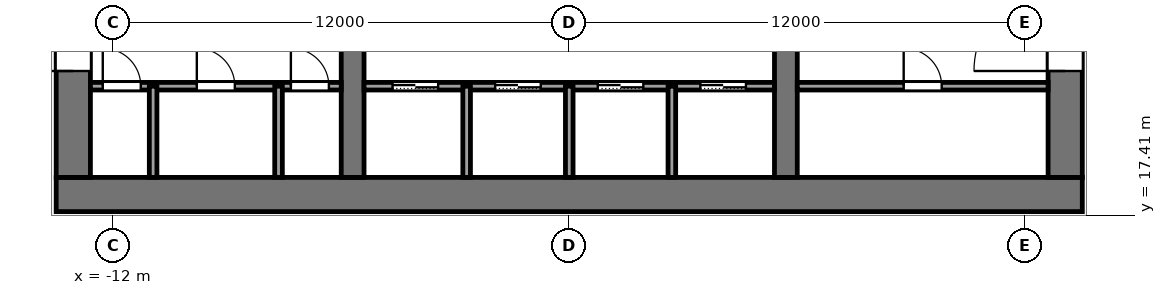
"""IFC4 building model, lengths in metres.
Left out: names, types, materials, properties, quantities, classifications, styles, units other than length and angle.
Written with IfcOpenShell. Run it as: python <this file> out.ifc"""

import sys

from ifc_helpers import new_model, si_unit, direction, frame, frame_2d, origin, place, context, subcontext, project, spatial, rectangle, extrude, element, fill, save


model = new_model("IFC4")
c1 = context("Model", 3, precision=1e-05, world=origin(), true_north=direction((0.0, 1.0)))
c2 = subcontext(c1, "Body", "Model", "MODEL_VIEW")
j1 = project(units=[si_unit("LENGTHUNIT", "METRE"), si_unit("PLANEANGLEUNIT", "RADIAN")], contexts=[c1])
p1 = place(None, origin())
s1 = spatial("IfcSite", under=j1, at=p1, CompositionType="ELEMENT")
p2 = place(p1, origin())
s2 = spatial("IfcBuilding", under=s1, at=p2, CompositionType="ELEMENT")
p3 = place(p2, frame((0.0, 0.0, 202.0)))
s3 = spatial("IfcBuildingStorey", under=s2, at=p3, CompositionType="ELEMENT", Elevation=202.0)
p4 = place(p3, frame((-13.5, 17.95, -0.13), z_axis=(0.0, 0.0, 1.0), x_axis=(1.0, 0.0, 0.0)))
e1 = element("IfcWall", 1, at=p4, inside=s3, PredefinedType="SHEAR", context=c2, shape_type="SweptSolid", body=[
    extrude(rectangle(XDim=27.0, YDim=0.9, at=frame_2d((13.5, 0.0))), origin(), (0.0, 0.0, 1.0), 4.0),
])
p5 = place(p3, frame((-13.05, 18.4, -0.13), z_axis=(0.0, 0.0, 1.0), x_axis=(0.0, 1.0, 0.0)))
e2 = element("IfcWall", 2, at=p5, inside=s3, PredefinedType="SHEAR", context=c2, shape_type="SweptSolid", body=[
    extrude(rectangle(XDim=19.2, YDim=0.9, at=frame_2d((9.6, 0.0))), origin(), (0.0, 0.0, 1.0), 4.0),
])
p6 = place(p5, frame((2.8, 0.0, 0.13)))
e3 = element("IfcOpeningElement", 3, at=p6, cuts=e2, PredefinedType="OPENING", context=c2, shape_type="SweptSolid", body=[
    extrude(rectangle(XDim=2.4, YDim=2.4, at=frame_2d((1.2, 1.2))), frame((0.0, 0.46, 0.0), z_axis=(0.0, -1.0, 0.0), x_axis=(1.0, 0.0, 0.0)), (0.0, 0.0, 1.0), 0.92),
])
p7 = place(p5, frame((13.4, 0.0, 0.13)))
e4 = element("IfcOpeningElement", 4, at=p7, cuts=e2, PredefinedType="OPENING", context=c2, shape_type="SweptSolid", body=[
    extrude(rectangle(XDim=1.4, YDim=2.2, at=frame_2d((0.7, 1.1))), frame((0.0, 0.46, 0.0), z_axis=(0.0, -1.0, 0.0), x_axis=(1.0, 0.0, 0.0)), (0.0, 0.0, 1.0), 0.92),
])
p8 = place(p3, frame((13.05, 18.4, -0.13), z_axis=(0.0, 0.0, 1.0), x_axis=(0.0, 1.0, 0.0)))
e5 = element("IfcWall", 5, at=p8, inside=s3, PredefinedType="SHEAR", context=c2, shape_type="SweptSolid", body=[
    extrude(rectangle(XDim=19.2, YDim=0.9, at=frame_2d((9.6, 0.0))), origin(), (0.0, 0.0, 1.0), 4.0),
])
p9 = place(p8, frame((2.8, 0.0, 0.13)))
e6 = element("IfcOpeningElement", 6, at=p9, cuts=e5, PredefinedType="OPENING", context=c2, shape_type="SweptSolid", body=[
    extrude(rectangle(XDim=2.4, YDim=2.4, at=frame_2d((1.2, 1.2))), frame((0.0, 0.46, 0.0), z_axis=(0.0, -1.0, 0.0), x_axis=(1.0, 0.0, 0.0)), (0.0, 0.0, 1.0), 0.92),
])
p10 = place(p8, frame((13.3, 0.0, 0.13)))
e7 = element("IfcOpeningElement", 7, at=p10, cuts=e5, PredefinedType="OPENING", context=c2, shape_type="SweptSolid", body=[
    extrude(rectangle(XDim=2.4, YDim=2.4, at=frame_2d((1.2, 1.2))), frame((0.0, 0.46, 0.0), z_axis=(0.0, -1.0, 0.0), x_axis=(1.0, 0.0, 0.0)), (0.0, 0.0, 1.0), 0.92),
])
p11 = place(p3, frame((-5.7, 18.4, -0.13), z_axis=(0.0, 0.0, 1.0), x_axis=(0.0, 1.0, 0.0)))
e8 = element("IfcWall", 8, at=p11, inside=s3, PredefinedType="SHEAR", context=c2, shape_type="SweptSolid", body=[
    extrude(rectangle(XDim=19.2, YDim=0.6, at=frame_2d((9.6, 0.0))), origin(), (0.0, 0.0, 1.0), 4.0),
])
p12 = place(p11, frame((8.35, 0.0, 0.13)))
e9 = element("IfcOpeningElement", 9, at=p12, cuts=e8, PredefinedType="OPENING", context=c2, shape_type="SweptSolid", body=[
    extrude(rectangle(XDim=0.9, YDim=2.1, at=frame_2d((0.45, 1.05))), frame((0.0, 0.31, 0.0), z_axis=(0.0, -1.0, 0.0), x_axis=(1.0, 0.0, 0.0)), (0.0, 0.0, 1.0), 0.62),
])
p13 = place(p3, frame((5.7, 18.4, -0.13), z_axis=(0.0, 0.0, 1.0), x_axis=(0.0, 1.0, 0.0)))
e10 = element("IfcWall", 10, at=p13, inside=s3, PredefinedType="SHEAR", context=c2, shape_type="SweptSolid", body=[
    extrude(rectangle(XDim=19.2, YDim=0.6, at=frame_2d((9.6, 0.0))), origin(), (0.0, 0.0, 1.0), 4.0),
])
p14 = place(p13, frame((8.35, 0.0, 0.13)))
e11 = element("IfcOpeningElement", 11, at=p14, cuts=e10, PredefinedType="OPENING", context=c2, shape_type="SweptSolid", body=[
    extrude(rectangle(XDim=0.9, YDim=2.1, at=frame_2d((0.45, 1.05))), frame((0.0, 0.31, 0.0), z_axis=(0.0, -1.0, 0.0), x_axis=(1.0, 0.0, 0.0)), (0.0, 0.0, 1.0), 0.62),
])
p15 = place(p13, frame((13.3, 0.0, 0.13)))
e12 = element("IfcOpeningElement", 12, at=p15, cuts=e10, PredefinedType="OPENING", context=c2, shape_type="SweptSolid", body=[
    extrude(rectangle(XDim=2.4, YDim=2.4, at=frame_2d((1.2, 1.2))), frame((0.0, 0.31, 0.0), z_axis=(0.0, -1.0, 0.0), x_axis=(1.0, 0.0, 0.0)), (0.0, 0.0, 1.0), 0.62),
])
p16 = place(p3, frame((-12.6, 20.8, 0.0), z_axis=(0.0, 0.0, 1.0), x_axis=(1.0, 0.0, 0.0)))
e13 = element("IfcWall", 13, at=p16, inside=s3, PredefinedType="PARTITIONING", context=c2, shape_type="SweptSolid", body=[
    extrude(rectangle(XDim=6.6, YDim=0.2, at=frame_2d((3.3, 0.0))), origin(), (0.0, 0.0, 1.0), 3.87),
])
p17 = place(p16, frame((0.325, 0.0, 0.0)))
e14 = element("IfcOpeningElement", 14, at=p17, cuts=e13, PredefinedType="OPENING", context=c2, shape_type="SweptSolid", body=[
    extrude(rectangle(XDim=1.0, YDim=2.1, at=frame_2d((0.5, 1.05))), frame((0.0, 0.11, 0.0), z_axis=(0.0, -1.0, 0.0), x_axis=(1.0, 0.0, 0.0)), (0.0, 0.0, 1.0), 0.22),
])
p18 = place(p16, frame((2.8, 0.0, 0.0)))
e15 = element("IfcOpeningElement", 15, at=p18, cuts=e13, PredefinedType="OPENING", context=c2, shape_type="SweptSolid", body=[
    extrude(rectangle(XDim=1.0, YDim=2.1, at=frame_2d((0.5, 1.05))), frame((0.0, 0.11, 0.0), z_axis=(0.0, -1.0, 0.0), x_axis=(1.0, 0.0, 0.0)), (0.0, 0.0, 1.0), 0.22),
])
p19 = place(p16, frame((5.275, 0.0, 0.0)))
e16 = element("IfcOpeningElement", 16, at=p19, cuts=e13, PredefinedType="OPENING", context=c2, shape_type="SweptSolid", body=[
    extrude(rectangle(XDim=1.0, YDim=2.1, at=frame_2d((0.5, 1.05))), frame((0.0, 0.11, 0.0), z_axis=(0.0, -1.0, 0.0), x_axis=(1.0, 0.0, 0.0)), (0.0, 0.0, 1.0), 0.22),
])
p20 = place(p3, frame((-5.4, 20.8, 0.0), z_axis=(0.0, 0.0, 1.0), x_axis=(1.0, 0.0, 0.0)))
e17 = element("IfcWall", 17, at=p20, inside=s3, PredefinedType="PARTITIONING", context=c2, shape_type="SweptSolid", body=[
    extrude(rectangle(XDim=10.8, YDim=0.2, at=frame_2d((5.4, 0.0))), origin(), (0.0, 0.0, 1.0), 3.87),
])
p21 = place(p20, frame((0.75, 0.0, 0.0)))
e18 = element("IfcOpeningElement", 18, at=p21, cuts=e17, PredefinedType="OPENING", context=c2, shape_type="SweptSolid", body=[
    extrude(rectangle(XDim=1.2, YDim=2.2, at=frame_2d((0.6, 1.1))), frame((0.0, 0.11, 0.0), z_axis=(0.0, -1.0, 0.0), x_axis=(1.0, 0.0, 0.0)), (0.0, 0.0, 1.0), 0.22),
])
p22 = place(p20, frame((3.45, 0.0, 0.0)))
e19 = element("IfcOpeningElement", 19, at=p22, cuts=e17, PredefinedType="OPENING", context=c2, shape_type="SweptSolid", body=[
    extrude(rectangle(XDim=1.2, YDim=2.2, at=frame_2d((0.6, 1.1))), frame((0.0, 0.11, 0.0), z_axis=(0.0, -1.0, 0.0), x_axis=(1.0, 0.0, 0.0)), (0.0, 0.0, 1.0), 0.22),
])
p23 = place(p20, frame((6.15, 0.0, 0.0)))
e20 = element("IfcOpeningElement", 20, at=p23, cuts=e17, PredefinedType="OPENING", context=c2, shape_type="SweptSolid", body=[
    extrude(rectangle(XDim=1.2, YDim=2.2, at=frame_2d((0.6, 1.1))), frame((0.0, 0.11, 0.0), z_axis=(0.0, -1.0, 0.0), x_axis=(1.0, 0.0, 0.0)), (0.0, 0.0, 1.0), 0.22),
])
p24 = place(p20, frame((8.85, 0.0, 0.0)))
e21 = element("IfcOpeningElement", 21, at=p24, cuts=e17, PredefinedType="OPENING", context=c2, shape_type="SweptSolid", body=[
    extrude(rectangle(XDim=1.2, YDim=2.2, at=frame_2d((0.6, 1.1))), frame((0.0, 0.11, 0.0), z_axis=(0.0, -1.0, 0.0), x_axis=(1.0, 0.0, 0.0)), (0.0, 0.0, 1.0), 0.22),
])
p25 = place(p3, frame((6.0, 20.8, 0.0), z_axis=(0.0, 0.0, 1.0), x_axis=(1.0, 0.0, 0.0)))
e22 = element("IfcWall", 22, at=p25, inside=s3, PredefinedType="PARTITIONING", context=c2, shape_type="SweptSolid", body=[
    extrude(rectangle(XDim=6.6, YDim=0.2, at=frame_2d((3.3, 0.0))), origin(), (0.0, 0.0, 1.0), 3.87),
])
p26 = place(p25, frame((2.8, 0.0, 0.0)))
e23 = element("IfcOpeningElement", 23, at=p26, cuts=e22, PredefinedType="OPENING", context=c2, shape_type="SweptSolid", body=[
    extrude(rectangle(XDim=1.0, YDim=2.1, at=frame_2d((0.5, 1.05))), frame((0.0, 0.11, 0.0), z_axis=(0.0, -1.0, 0.0), x_axis=(1.0, 0.0, 0.0)), (0.0, 0.0, 1.0), 0.22),
])
for number, where, z_axis, x_axis in (
    (24, (-10.95, 18.4, 0.0), (0.0, 0.0, 1.0), (0.0, 1.0, 0.0)),
    (25, (-7.65, 18.4, 0.0), (0.0, 0.0, 1.0), (0.0, 1.0, 0.0)),
    (26, (-2.7, 18.4, 0.0), (0.0, 0.0, 1.0), (0.0, 1.0, 0.0)),
    (27, (0.0, 18.4, 0.0), (0.0, 0.0, 1.0), (0.0, 1.0, 0.0)),
    (28, (2.7, 18.4, 0.0), (0.0, 0.0, 1.0), (0.0, 1.0, 0.0)),
):
    element("IfcWall", number, at=place(p3, frame(where, z_axis=z_axis, x_axis=x_axis)), inside=s3, PredefinedType="PARTITIONING", context=c2, shape_type="SweptSolid", body=[
        extrude(rectangle(XDim=2.4, YDim=0.2, at=frame_2d((1.2, 0.0))), origin(), (0.0, 0.0, 1.0), 3.87),
    ])
p27 = place(p21, origin())
e29 = element("IfcDoor", 29, at=p27, inside=s3, OperationType="SLIDING_TO_LEFT", PredefinedType="DOOR", context=c2, shape_type="SweptSolid", body=[
    extrude(rectangle(XDim=1.2, YDim=2.2, at=frame_2d((0.6, 1.1))), frame((0.0, 0.025, 0.0), z_axis=(0.0, -1.0, 0.0), x_axis=(1.0, 0.0, 0.0)), (0.0, 0.0, 1.0), 0.05),
])
fill(e18, e29)
p28 = place(p22, origin())
e30 = element("IfcDoor", 30, at=p28, inside=s3, OperationType="SLIDING_TO_LEFT", PredefinedType="DOOR", context=c2, shape_type="SweptSolid", body=[
    extrude(rectangle(XDim=1.2, YDim=2.2, at=frame_2d((0.6, 1.1))), frame((0.0, 0.025, 0.0), z_axis=(0.0, -1.0, 0.0), x_axis=(1.0, 0.0, 0.0)), (0.0, 0.0, 1.0), 0.05),
])
fill(e19, e30)
p29 = place(p23, origin())
e31 = element("IfcDoor", 31, at=p29, inside=s3, OperationType="SLIDING_TO_LEFT", PredefinedType="DOOR", context=c2, shape_type="SweptSolid", body=[
    extrude(rectangle(XDim=1.2, YDim=2.2, at=frame_2d((0.6, 1.1))), frame((0.0, 0.025, 0.0), z_axis=(0.0, -1.0, 0.0), x_axis=(1.0, 0.0, 0.0)), (0.0, 0.0, 1.0), 0.05),
])
fill(e20, e31)
p30 = place(p24, origin())
e32 = element("IfcDoor", 32, at=p30, inside=s3, OperationType="SLIDING_TO_LEFT", PredefinedType="DOOR", context=c2, shape_type="SweptSolid", body=[
    extrude(rectangle(XDim=1.2, YDim=2.2, at=frame_2d((0.6, 1.1))), frame((0.0, 0.025, 0.0), z_axis=(0.0, -1.0, 0.0), x_axis=(1.0, 0.0, 0.0)), (0.0, 0.0, 1.0), 0.05),
])
fill(e21, e32)
p31 = place(p17, origin())
e33 = element("IfcDoor", 33, at=p31, inside=s3, OperationType="SINGLE_SWING_RIGHT", PredefinedType="DOOR", context=c2, shape_type="SweptSolid", body=[
    extrude(rectangle(XDim=1.0, YDim=2.1, at=frame_2d((0.5, 1.05))), frame((0.0, 0.025, 0.0), z_axis=(0.0, -1.0, 0.0), x_axis=(1.0, 0.0, 0.0)), (0.0, 0.0, 1.0), 0.05),
])
fill(e14, e33)
p32 = place(p18, origin())
e34 = element("IfcDoor", 34, at=p32, inside=s3, OperationType="SINGLE_SWING_RIGHT", PredefinedType="DOOR", context=c2, shape_type="SweptSolid", body=[
    extrude(rectangle(XDim=1.0, YDim=2.1, at=frame_2d((0.5, 1.05))), frame((0.0, 0.025, 0.0), z_axis=(0.0, -1.0, 0.0), x_axis=(1.0, 0.0, 0.0)), (0.0, 0.0, 1.0), 0.05),
])
fill(e15, e34)
p33 = place(p19, origin())
e35 = element("IfcDoor", 35, at=p33, inside=s3, OperationType="SINGLE_SWING_RIGHT", PredefinedType="DOOR", context=c2, shape_type="SweptSolid", body=[
    extrude(rectangle(XDim=1.0, YDim=2.1, at=frame_2d((0.5, 1.05))), frame((0.0, 0.025, 0.0), z_axis=(0.0, -1.0, 0.0), x_axis=(1.0, 0.0, 0.0)), (0.0, 0.0, 1.0), 0.05),
])
fill(e16, e35)
p34 = place(p26, origin())
e36 = element("IfcDoor", 36, at=p34, inside=s3, OperationType="SINGLE_SWING_RIGHT", PredefinedType="DOOR", context=c2, shape_type="SweptSolid", body=[
    extrude(rectangle(XDim=1.0, YDim=2.1, at=frame_2d((0.5, 1.05))), frame((0.0, 0.025, 0.0), z_axis=(0.0, -1.0, 0.0), x_axis=(1.0, 0.0, 0.0)), (0.0, 0.0, 1.0), 0.05),
])
fill(e23, e36)
p35 = place(p6, origin())
e37 = element("IfcDoor", 37, at=p35, inside=s3, OperationType="DOUBLE_DOOR_SINGLE_SWING", PredefinedType="DOOR", context=c2, shape_type="SweptSolid", body=[
    extrude(rectangle(XDim=2.4, YDim=2.4, at=frame_2d((1.2, 1.2))), frame((0.0, 0.025, 0.0), z_axis=(0.0, -1.0, 0.0), x_axis=(1.0, 0.0, 0.0)), (0.0, 0.0, 1.0), 0.05),
])
fill(e3, e37)
p36 = place(p9, origin())
e38 = element("IfcDoor", 38, at=p36, inside=s3, OperationType="DOUBLE_DOOR_SINGLE_SWING", PredefinedType="DOOR", context=c2, shape_type="SweptSolid", body=[
    extrude(rectangle(XDim=2.4, YDim=2.4, at=frame_2d((1.2, 1.2))), frame((0.0, 0.025, 0.0), z_axis=(0.0, -1.0, 0.0), x_axis=(1.0, 0.0, 0.0)), (0.0, 0.0, 1.0), 0.05),
])
fill(e6, e38)
save(model, sys.argv[1])
